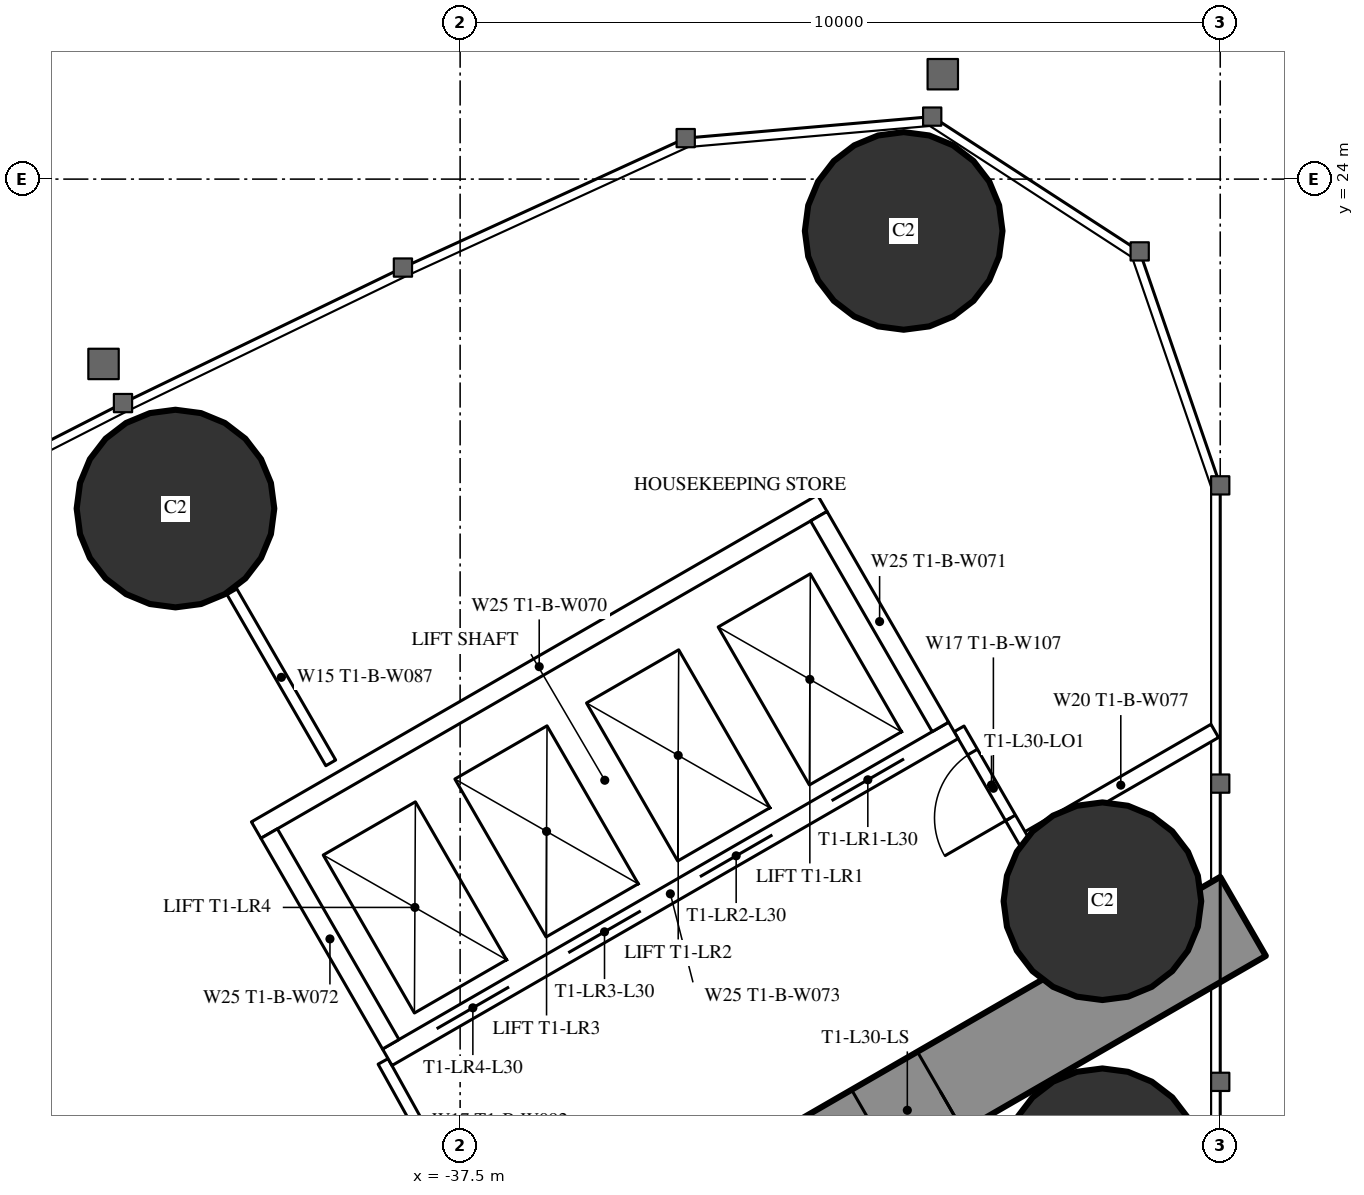
"""IFC4 building model, lengths in metres.
Left out: names, types, materials, properties, quantities, classifications, styles, units other than length and angle.
Written with IfcOpenShell. Run it as: python <this file> out.ifc"""

import sys

from ifc_helpers import new_model, si_unit, direction, frame, frame_2d, origin, origin_2d, place, context, subcontext, project, spatial, rectangle, hollow_circle, extrude, element, fill, save


model = new_model("IFC4")
c1 = context("Model", 3, precision=1e-05, world=origin(), true_north=direction((0.0, 1.0)))
c2 = subcontext(c1, "Body", "Model", "MODEL_VIEW")
j1 = project(units=[si_unit("LENGTHUNIT", "METRE"), si_unit("PLANEANGLEUNIT", "RADIAN")], contexts=[c1])
p1 = place(None, origin())
s1 = spatial("IfcSite", under=j1, at=p1, CompositionType="ELEMENT")
p2 = place(p1, origin())
s2 = spatial("IfcBuilding", under=s1, at=p2, CompositionType="ELEMENT")
p3 = place(p2, frame((0.0, 0.0, 115.1)))
s3 = spatial("IfcBuildingStorey", under=s2, at=p3, CompositionType="ELEMENT", Elevation=115.1)
for number, where, z_axis, x_axis in (
    (1, (-31.665, 23.318, 0.0), (0.0, 0.0, 1.0), (1.0, 0.0, 0.0)),
    (2, (-29.05, 11.0, 0.0), (0.0, 0.0, 1.0), (1.0, 0.0, 0.0)),
    (3, (-29.05, 14.5, 0.0), (0.0, 0.0, 1.0), (1.0, 0.0, 0.0)),
    (4, (-41.245, 19.666, 0.0), (0.0, 0.0, 1.0), (1.0, 0.0, 0.0)),
):
    element("IfcColumn", number, at=place(p3, frame(where, z_axis=z_axis, x_axis=x_axis)), inside=s3, PredefinedType="COLUMN", context=c2, shape_type="SweptSolid", body=[
        extrude(hollow_circle(Radius=1.3, WallThickness=0.1, at=origin_2d()), origin(), (0.0, 0.0, 1.0), 3.5),
    ])
p4 = place(p3, frame((-27.2, 14.3, 0.0), z_axis=(0.0, 0.0, 1.0), x_axis=(-0.866026593062, -0.499997940104, 0.0)))
e5 = element("IfcWall", 5, at=p4, inside=s3, PredefinedType="SHEAR", context=c2, shape_type="SweptSolid", body=[
    extrude(rectangle(XDim=28.946, YDim=1.2, at=frame_2d((14.473, 0.0))), origin(), (0.0, 0.0, 1.0), 3.5),
])
p5 = place(p4, frame((4.6, 0.0, 0.0)))
e6 = element("IfcOpeningElement", 6, at=p5, cuts=e5, PredefinedType="OPENING", context=c2, shape_type="SweptSolid", body=[
    extrude(rectangle(XDim=1.0, YDim=2.2, at=frame_2d((0.5, 1.1))), frame((0.0, 0.61, 0.0), z_axis=(0.0, -1.0, 0.0), x_axis=(1.0, 0.0, 0.0)), (0.0, 0.0, 1.0), 1.22),
])
p6 = place(p4, frame((13.395, 0.0, 0.0)))
e7 = element("IfcOpeningElement", 7, at=p6, cuts=e5, PredefinedType="OPENING", context=c2, shape_type="SweptSolid", body=[
    extrude(rectangle(XDim=1.8, YDim=2.2, at=frame_2d((0.9, 1.1))), frame((0.0, 0.61, 0.0), z_axis=(0.0, -1.0, 0.0), x_axis=(1.0, 0.0, 0.0)), (0.0, 0.0, 1.0), 1.22),
])
p7 = place(p3, frame((-39.202, 16.32, 0.0), z_axis=(0.0, 0.0, 1.0), x_axis=(-0.499947391036, 0.866055775454, 0.0)))
e8 = element("IfcWall", 8, at=p7, inside=s3, PredefinedType="PARTITIONING", context=c2, shape_type="SweptSolid", body=[
    extrude(rectangle(XDim=2.599, YDim=0.15, at=frame_2d((1.3, 0.0))), origin(), (0.0, 0.0, 1.0), 3.25),
])
p8 = place(p3, frame((-27.572, 16.741, 0.0), z_axis=(0.0, 0.0, 1.0), x_axis=(-0.866034618596, -0.499984039138, 0.0)))
e9 = element("IfcWall", 9, at=p8, inside=s3, PredefinedType="PARTITIONING", context=c2, shape_type="SweptSolid", body=[
    extrude(rectangle(XDim=2.854, YDim=0.2, at=frame_2d((1.427, 0.0))), origin(), (0.0, 0.0, 1.0), 3.25),
])
p9 = place(p3, frame((-38.513, 12.392, 0.0), z_axis=(0.0, 0.0, 1.0), x_axis=(0.485585508183, -0.874189175317, 0.0)))
e10 = element("IfcWall", 10, at=p9, inside=s3, PredefinedType="PARTITIONING", context=c2, shape_type="SweptSolid", body=[
    extrude(rectangle(XDim=1.805, YDim=0.15, at=frame_2d((0.902, 0.0))), origin(), (0.0, 0.0, 1.0), 3.25),
])
p10 = place(p3, frame((-30.033, 15.205, 0.0), z_axis=(0.0, 0.0, 1.0), x_axis=(-0.499980071345, 0.866036909293, 0.0)))
e11 = element("IfcWall", 11, at=p10, inside=s3, PredefinedType="PARTITIONING", context=c2, shape_type="SweptSolid", body=[
    extrude(rectangle(XDim=1.805, YDim=0.15, at=frame_2d((0.902, 0.0))), origin(), (0.0, 0.0, 1.0), 2.2),
])
p11 = place(p10, frame((0.452, 0.0, 0.0)))
e12 = element("IfcOpeningElement", 12, at=p11, cuts=e11, PredefinedType="OPENING", context=c2, shape_type="SweptSolid", body=[
    extrude(rectangle(XDim=1.0, YDim=2.2, at=frame_2d((0.5, 1.1))), frame((0.0, 0.085, 0.0), z_axis=(0.0, -1.0, 0.0), x_axis=(1.0, 0.0, 0.0)), (0.0, 0.0, 1.0), 0.17),
])
p12 = place(p3, frame((-31.01, 16.747, 0.0), z_axis=(0.0, 0.0, 1.0), x_axis=(-0.866028165386, -0.499995216735, 0.0)))
e13 = element("IfcWall", 13, at=p12, inside=s3, PredefinedType="PARTITIONING", context=c2, shape_type="SweptSolid", body=[
    extrude(rectangle(XDim=8.6, YDim=0.25, at=frame_2d((4.3, 0.0))), origin(), (0.0, 0.0, 1.0), 3.25),
])
p13 = place(p12, frame((0.75, 0.0, 0.0)))
e14 = element("IfcOpeningElement", 14, at=p13, cuts=e13, PredefinedType="OPENING", context=c2, shape_type="SweptSolid", body=[
    extrude(rectangle(XDim=1.1, YDim=2.2, at=frame_2d((0.55, 1.1))), frame((0.0, 0.135, 0.0), z_axis=(0.0, -1.0, 0.0), x_axis=(1.0, 0.0, 0.0)), (0.0, 0.0, 1.0), 0.27),
])
p14 = place(p12, frame((2.75, 0.0, 0.0)))
e15 = element("IfcOpeningElement", 15, at=p14, cuts=e13, PredefinedType="OPENING", context=c2, shape_type="SweptSolid", body=[
    extrude(rectangle(XDim=1.1, YDim=2.2, at=frame_2d((0.55, 1.1))), frame((0.0, 0.135, 0.0), z_axis=(0.0, -1.0, 0.0), x_axis=(1.0, 0.0, 0.0)), (0.0, 0.0, 1.0), 0.27),
])
p15 = place(p12, frame((4.75, 0.0, 0.0)))
e16 = element("IfcOpeningElement", 16, at=p15, cuts=e13, PredefinedType="OPENING", context=c2, shape_type="SweptSolid", body=[
    extrude(rectangle(XDim=1.1, YDim=2.2, at=frame_2d((0.55, 1.1))), frame((0.0, 0.135, 0.0), z_axis=(0.0, -1.0, 0.0), x_axis=(1.0, 0.0, 0.0)), (0.0, 0.0, 1.0), 0.27),
])
p16 = place(p12, frame((6.75, 0.0, 0.0)))
e17 = element("IfcOpeningElement", 17, at=p16, cuts=e13, PredefinedType="OPENING", context=c2, shape_type="SweptSolid", body=[
    extrude(rectangle(XDim=1.1, YDim=2.2, at=frame_2d((0.55, 1.1))), frame((0.0, 0.135, 0.0), z_axis=(0.0, -1.0, 0.0), x_axis=(1.0, 0.0, 0.0)), (0.0, 0.0, 1.0), 0.27),
])
p17 = place(p3, frame((-32.736, 19.736, 0.0), z_axis=(0.0, 0.0, 1.0), x_axis=(-0.866028165386, -0.499995216735, 0.0)))
e18 = element("IfcWall", 18, at=p17, inside=s3, PredefinedType="PARTITIONING", context=c2, shape_type="SweptSolid", body=[
    extrude(rectangle(XDim=8.6, YDim=0.25, at=frame_2d((4.3, 0.0))), origin(), (0.0, 0.0, 1.0), 3.25),
])
p18 = place(p3, frame((-31.181, 16.793, 0.0), z_axis=(0.0, 0.0, 1.0), x_axis=(-0.499929347863, 0.866066190972, 0.0)))
e19 = element("IfcWall", 19, at=p18, inside=s3, PredefinedType="PARTITIONING", context=c2, shape_type="SweptSolid", body=[
    extrude(rectangle(XDim=3.201, YDim=0.25, at=frame_2d((1.6, 0.0))), origin(), (0.0, 0.0, 1.0), 3.25),
])
p19 = place(p3, frame((-38.413, 12.618, 0.0), z_axis=(0.0, 0.0, 1.0), x_axis=(-0.499872130319, 0.866099216793, 0.0)))
e20 = element("IfcWall", 20, at=p19, inside=s3, PredefinedType="PARTITIONING", context=c2, shape_type="SweptSolid", body=[
    extrude(rectangle(XDim=3.2, YDim=0.25, at=frame_2d((1.6, 0.0))), origin(), (0.0, 0.0, 1.0), 3.25),
])
p20 = place(p11, origin())
e21 = element("IfcDoor", 21, at=p20, inside=s3, OperationType="SINGLE_SWING_LEFT", PredefinedType="DOOR", context=c2, shape_type="SweptSolid", body=[
    extrude(rectangle(XDim=1.0, YDim=2.2, at=frame_2d((0.5, 1.1))), frame((0.0, 0.025, 0.0), z_axis=(0.0, -1.0, 0.0), x_axis=(1.0, 0.0, 0.0)), (0.0, 0.0, 1.0), 0.05),
])
fill(e12, e21)
p21 = place(p5, origin())
e22 = element("IfcDoor", 22, at=p21, inside=s3, OperationType="SINGLE_SWING_LEFT", PredefinedType="DOOR", context=c2, shape_type="SweptSolid", body=[
    extrude(rectangle(XDim=1.0, YDim=2.2, at=frame_2d((0.5, 1.1))), frame((0.0, 0.025, 0.0), z_axis=(0.0, -1.0, 0.0), x_axis=(1.0, 0.0, 0.0)), (0.0, 0.0, 1.0), 0.05),
])
fill(e6, e22)
p22 = place(p13, origin())
e23 = element("IfcDoor", 23, at=p22, inside=s3, OperationType="DOUBLE_DOOR_SLIDING", PredefinedType="USERDEFINED", context=c2, shape_type="SweptSolid", body=[
    extrude(rectangle(XDim=1.1, YDim=2.2, at=frame_2d((0.55, 1.1))), frame((0.0, 0.025, 0.0), z_axis=(0.0, -1.0, 0.0), x_axis=(1.0, 0.0, 0.0)), (0.0, 0.0, 1.0), 0.05),
])
fill(e14, e23)
p23 = place(p14, origin())
e24 = element("IfcDoor", 24, at=p23, inside=s3, OperationType="DOUBLE_DOOR_SLIDING", PredefinedType="USERDEFINED", context=c2, shape_type="SweptSolid", body=[
    extrude(rectangle(XDim=1.1, YDim=2.2, at=frame_2d((0.55, 1.1))), frame((0.0, 0.025, 0.0), z_axis=(0.0, -1.0, 0.0), x_axis=(1.0, 0.0, 0.0)), (0.0, 0.0, 1.0), 0.05),
])
fill(e15, e24)
p24 = place(p15, origin())
e25 = element("IfcDoor", 25, at=p24, inside=s3, OperationType="DOUBLE_DOOR_SLIDING", PredefinedType="USERDEFINED", context=c2, shape_type="SweptSolid", body=[
    extrude(rectangle(XDim=1.1, YDim=2.2, at=frame_2d((0.55, 1.1))), frame((0.0, 0.025, 0.0), z_axis=(0.0, -1.0, 0.0), x_axis=(1.0, 0.0, 0.0)), (0.0, 0.0, 1.0), 0.05),
])
fill(e16, e25)
p25 = place(p16, origin())
e26 = element("IfcDoor", 26, at=p25, inside=s3, OperationType="DOUBLE_DOOR_SLIDING", PredefinedType="USERDEFINED", context=c2, shape_type="SweptSolid", body=[
    extrude(rectangle(XDim=1.1, YDim=2.2, at=frame_2d((0.55, 1.1))), frame((0.0, 0.025, 0.0), z_axis=(0.0, -1.0, 0.0), x_axis=(1.0, 0.0, 0.0)), (0.0, 0.0, 1.0), 0.05),
])
fill(e17, e26)
save(model, sys.argv[1])
